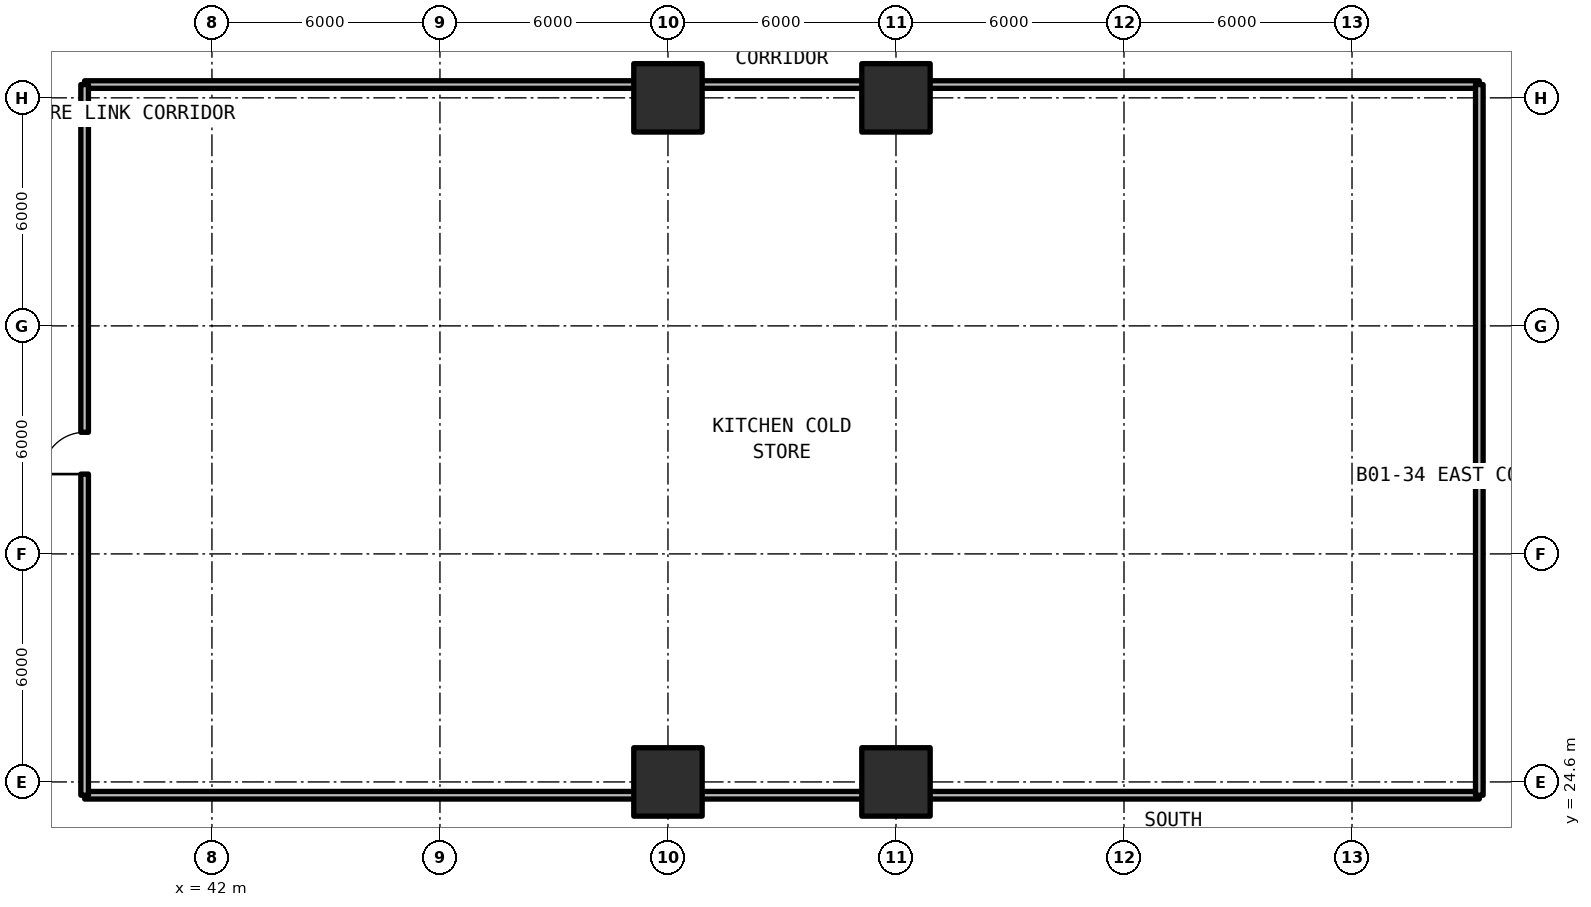
"""IFC4 building model, lengths in metres.
Left out: names, types, materials, properties, quantities, classifications, styles, units other than length and angle.
Written with IfcOpenShell. Run it as: python <this file> out.ifc"""

import sys

from ifc_helpers import new_model, si_unit, direction, frame, frame_2d, origin, origin_2d, place, context, subcontext, project, spatial, rectangle, extrude, element, fill, save


model = new_model("IFC4")
c1 = context("Model", 3, precision=1e-05, world=origin(), true_north=direction((0.0, 1.0)))
c2 = subcontext(c1, "Body", "Model", "MODEL_VIEW")
j1 = project(units=[si_unit("LENGTHUNIT", "METRE"), si_unit("PLANEANGLEUNIT", "RADIAN")], contexts=[c1])
p1 = place(None, origin())
s1 = spatial("IfcSite", under=j1, at=p1, CompositionType="ELEMENT")
p2 = place(p1, origin())
s2 = spatial("IfcBuilding", under=s1, at=p2, CompositionType="ELEMENT")
p3 = place(p2, frame((0.0, 0.0, -4.62)))
s3 = spatial("IfcBuildingStorey", under=s2, at=p3, CompositionType="ELEMENT", Elevation=-4.62)
for number, where, z_axis, x_axis in (
    (1, (54.0, 24.6, 0.0), (0.0, 0.0, 1.0), (1.0, 0.0, 0.0)),
    (2, (54.0, 42.6, 0.0), (0.0, 0.0, 1.0), (1.0, 0.0, 0.0)),
    (3, (60.0, 24.6, 0.0), (0.0, 0.0, 1.0), (1.0, 0.0, 0.0)),
    (4, (60.0, 42.6, 0.0), (0.0, 0.0, 1.0), (1.0, 0.0, 0.0)),
):
    element("IfcColumn", number, at=place(p3, frame(where, z_axis=z_axis, x_axis=x_axis)), inside=s3, PredefinedType="COLUMN", context=c2, shape_type="SweptSolid", body=[
        extrude(rectangle(XDim=1.8, YDim=1.8, at=origin_2d()), origin(), (0.0, 0.0, 1.0), 4.62),
    ])
for number, where, z_axis, x_axis in (
    (5, (38.65, 24.25, 0.0), (0.0, 0.0, 1.0), (1.0, 0.0, 0.0)),
    (6, (38.65, 42.95, 0.0), (0.0, 0.0, 1.0), (1.0, 0.0, 0.0)),
):
    element("IfcWall", number, at=place(p3, frame(where, z_axis=z_axis, x_axis=x_axis)), inside=s3, PredefinedType="SOLIDWALL", context=c2, shape_type="SweptSolid", body=[
        extrude(rectangle(XDim=36.7, YDim=0.2, at=frame_2d((18.35, 0.0))), origin(), (0.0, 0.0, 1.0), 3.56),
    ])
p4 = place(p3, frame((38.65, 24.25, 0.0), z_axis=(0.0, 0.0, 1.0), x_axis=(0.0, 1.0, 0.0)))
e7 = element("IfcWall", 7, at=p4, inside=s3, PredefinedType="SOLIDWALL", context=c2, shape_type="SweptSolid", body=[
    extrude(rectangle(XDim=18.7, YDim=0.2, at=frame_2d((9.35, 0.0))), origin(), (0.0, 0.0, 1.0), 3.56),
])
p5 = place(p4, frame((8.45, 0.0, 0.0)))
e8 = element("IfcOpeningElement", 8, at=p5, cuts=e7, PredefinedType="OPENING", context=c2, shape_type="SweptSolid", body=[
    extrude(rectangle(XDim=1.1, YDim=2.15, at=frame_2d((0.55, 1.075))), frame((0.0, 0.11, 0.0), z_axis=(0.0, -1.0, 0.0), x_axis=(1.0, 0.0, 0.0)), (0.0, 0.0, 1.0), 0.22),
])
p6 = place(p3, frame((75.35, 24.25, 0.0), z_axis=(0.0, 0.0, 1.0), x_axis=(0.0, 1.0, 0.0)))
e9 = element("IfcWall", 9, at=p6, inside=s3, PredefinedType="SOLIDWALL", context=c2, shape_type="SweptSolid", body=[
    extrude(rectangle(XDim=18.7, YDim=0.2, at=frame_2d((9.35, 0.0))), origin(), (0.0, 0.0, 1.0), 3.56),
])
p7 = place(p5, origin())
e10 = element("IfcDoor", 10, at=p7, inside=s3, OperationType="SINGLE_SWING_LEFT", PredefinedType="DOOR", context=c2, shape_type="SweptSolid", body=[
    extrude(rectangle(XDim=1.1, YDim=2.15, at=frame_2d((0.55, 1.075))), frame((0.0, 0.025, 0.0), z_axis=(0.0, -1.0, 0.0), x_axis=(1.0, 0.0, 0.0)), (0.0, 0.0, 1.0), 0.05),
])
fill(e8, e10)
save(model, sys.argv[1])
